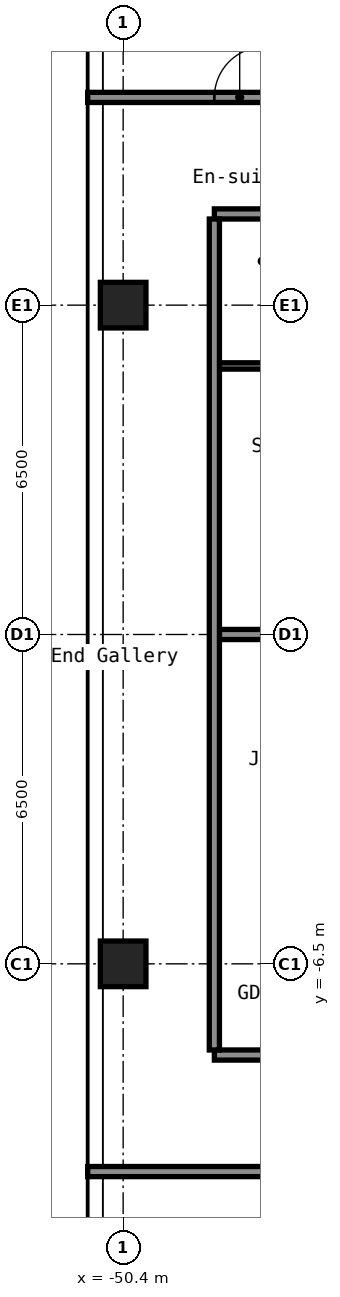
"""IFC4 building model, lengths in metres.
Left out: names, types, materials, properties, quantities, classifications, styles, units other than length and angle.
Written with IfcOpenShell. Run it as: python <this file> out.ifc"""

import sys

from ifc_helpers import new_model, si_unit, direction, frame, frame_2d, origin, origin_2d, place, context, subcontext, project, spatial, rectangle, hollow_rectangle, extrude, element, fill, save


model = new_model("IFC4")
c1 = context("Model", 3, precision=1e-05, world=origin(), true_north=direction((0.0, 1.0)))
c2 = subcontext(c1, "Body", "Model", "MODEL_VIEW")
j1 = project(units=[si_unit("LENGTHUNIT", "METRE"), si_unit("PLANEANGLEUNIT", "RADIAN")], contexts=[c1])
p1 = place(None, origin())
s1 = spatial("IfcSite", under=j1, at=p1, CompositionType="ELEMENT")
p2 = place(p1, origin())
s2 = spatial("IfcBuilding", under=s1, at=p2, CompositionType="ELEMENT")
p3 = place(p2, frame((0.0, 0.0, 26.2)))
s3 = spatial("IfcBuildingStorey", under=s2, at=p3, CompositionType="ELEMENT", Elevation=26.2)
for number, where, z_axis, x_axis in (
    (1, (-50.4, -6.5, 0.0), (0.0, 0.0, 1.0), (1.0, 0.0, 0.0)),
    (2, (-50.4, 6.5, 0.0), (0.0, 0.0, 1.0), (1.0, 0.0, 0.0)),
):
    element("IfcColumn", number, at=place(p3, frame(where, z_axis=z_axis, x_axis=x_axis)), inside=s3, PredefinedType="COLUMN", context=c2, shape_type="SweptSolid", body=[
        extrude(hollow_rectangle(XDim=0.9, YDim=0.9, WallThickness=0.036, at=origin_2d()), origin(), (0.0, 0.0, 1.0), 2.8),
    ])
p4 = place(p3, frame((-51.1, -10.6, 0.0), z_axis=(0.0, 0.0, 1.0), x_axis=(1.0, 0.0, 0.0)))
e3 = element("IfcWall", 3, at=p4, inside=s3, PredefinedType="PARTITIONING", context=c2, shape_type="SweptSolid", body=[
    extrude(rectangle(XDim=34.3, YDim=0.2, at=frame_2d((17.15, 0.0))), origin(), (0.0, 0.0, 1.0), 2.8),
])
p5 = place(p4, frame((4.2, 0.0, 0.0)))
e4 = element("IfcOpeningElement", 4, at=p5, cuts=e3, PredefinedType="OPENING", context=c2, shape_type="SweptSolid", body=[
    extrude(rectangle(XDim=1.0, YDim=2.1, at=frame_2d((0.5, 1.05))), frame((0.0, 0.11, 0.0), z_axis=(0.0, -1.0, 0.0), x_axis=(1.0, 0.0, 0.0)), (0.0, 0.0, 1.0), 0.22),
])
p6 = place(p4, frame((11.34, 0.0, 0.0)))
e5 = element("IfcOpeningElement", 5, at=p6, cuts=e3, PredefinedType="OPENING", context=c2, shape_type="SweptSolid", body=[
    extrude(rectangle(XDim=0.9, YDim=2.1, at=frame_2d((0.45, 1.05))), frame((0.0, 0.11, 0.0), z_axis=(0.0, -1.0, 0.0), x_axis=(1.0, 0.0, 0.0)), (0.0, 0.0, 1.0), 0.22),
])
p7 = place(p4, frame((15.54, 0.0, 0.0)))
e6 = element("IfcOpeningElement", 6, at=p7, cuts=e3, PredefinedType="OPENING", context=c2, shape_type="SweptSolid", body=[
    extrude(rectangle(XDim=0.9, YDim=2.1, at=frame_2d((0.45, 1.05))), frame((0.0, 0.11, 0.0), z_axis=(0.0, -1.0, 0.0), x_axis=(1.0, 0.0, 0.0)), (0.0, 0.0, 1.0), 0.22),
])
p8 = place(p4, frame((21.2, 0.0, 0.0)))
e7 = element("IfcOpeningElement", 7, at=p8, cuts=e3, PredefinedType="OPENING", context=c2, shape_type="SweptSolid", body=[
    extrude(rectangle(XDim=1.0, YDim=2.1, at=frame_2d((0.5, 1.05))), frame((0.0, 0.11, 0.0), z_axis=(0.0, -1.0, 0.0), x_axis=(1.0, 0.0, 0.0)), (0.0, 0.0, 1.0), 0.22),
])
p9 = place(p4, frame((27.97, 0.0, 0.0)))
e8 = element("IfcOpeningElement", 8, at=p9, cuts=e3, PredefinedType="OPENING", context=c2, shape_type="SweptSolid", body=[
    extrude(rectangle(XDim=0.9, YDim=2.1, at=frame_2d((0.45, 1.05))), frame((0.0, 0.11, 0.0), z_axis=(0.0, -1.0, 0.0), x_axis=(1.0, 0.0, 0.0)), (0.0, 0.0, 1.0), 0.22),
])
p10 = place(p4, frame((32.17, 0.0, 0.0)))
e9 = element("IfcOpeningElement", 9, at=p10, cuts=e3, PredefinedType="OPENING", context=c2, shape_type="SweptSolid", body=[
    extrude(rectangle(XDim=0.9, YDim=2.1, at=frame_2d((0.45, 1.05))), frame((0.0, 0.11, 0.0), z_axis=(0.0, -1.0, 0.0), x_axis=(1.0, 0.0, 0.0)), (0.0, 0.0, 1.0), 0.22),
])
p11 = place(p3, frame((-48.6, -8.3, 0.0), z_axis=(0.0, 0.0, 1.0), x_axis=(1.0, 0.0, 0.0)))
e10 = element("IfcWall", 10, at=p11, inside=s3, PredefinedType="PARTITIONING", context=c2, shape_type="SweptSolid", body=[
    extrude(rectangle(XDim=15.0, YDim=0.2, at=frame_2d((7.5, 0.0))), origin(), (0.0, 0.0, 1.0), 2.8),
])
p12 = place(p11, frame((1.1, 0.0, 0.0)))
e11 = element("IfcOpeningElement", 11, at=p12, cuts=e10, PredefinedType="OPENING", context=c2, shape_type="SweptSolid", body=[
    extrude(rectangle(XDim=1.0, YDim=2.1, at=frame_2d((0.5, 1.05))), frame((0.0, 0.11, 0.0), z_axis=(0.0, -1.0, 0.0), x_axis=(1.0, 0.0, 0.0)), (0.0, 0.0, 1.0), 0.22),
])
p13 = place(p11, frame((12.4, 0.0, 0.0)))
e12 = element("IfcOpeningElement", 12, at=p13, cuts=e10, PredefinedType="OPENING", context=c2, shape_type="SweptSolid", body=[
    extrude(rectangle(XDim=1.0, YDim=2.1, at=frame_2d((0.5, 1.05))), frame((0.0, 0.11, 0.0), z_axis=(0.0, -1.0, 0.0), x_axis=(1.0, 0.0, 0.0)), (0.0, 0.0, 1.0), 0.22),
])
p14 = place(p3, frame((-48.5, 0.0, 0.0), z_axis=(0.0, 0.0, 1.0), x_axis=(1.0, 0.0, 0.0)))
e13 = element("IfcWall", 13, at=p14, inside=s3, PredefinedType="PARTITIONING", context=c2, shape_type="SweptSolid", body=[
    extrude(rectangle(XDim=14.9, YDim=0.2, at=frame_2d((7.45, 0.0))), origin(), (0.0, 0.0, 1.0), 2.8),
])
p15 = place(p3, frame((-48.5, 5.3, 0.0), z_axis=(0.0, 0.0, 1.0), x_axis=(1.0, 0.0, 0.0)))
e14 = element("IfcWall", 14, at=p15, inside=s3, PredefinedType="PARTITIONING", context=c2, shape_type="SweptSolid", body=[
    extrude(rectangle(XDim=2.337, YDim=0.125, at=frame_2d((1.169, 0.0))), origin(), (0.0, 0.0, 1.0), 2.8),
])
p16 = place(p3, frame((-48.6, 8.3, 0.0), z_axis=(0.0, 0.0, 1.0), x_axis=(1.0, 0.0, 0.0)))
e15 = element("IfcWall", 15, at=p16, inside=s3, PredefinedType="PARTITIONING", context=c2, shape_type="SweptSolid", body=[
    extrude(rectangle(XDim=15.0, YDim=0.2, at=frame_2d((7.5, 0.0))), origin(), (0.0, 0.0, 1.0), 2.8),
])
p17 = place(p16, frame((4.05, 0.0, 0.0)))
e16 = element("IfcOpeningElement", 16, at=p17, cuts=e15, PredefinedType="OPENING", context=c2, shape_type="SweptSolid", body=[
    extrude(rectangle(XDim=1.0, YDim=2.1, at=frame_2d((0.5, 1.05))), frame((0.0, 0.11, 0.0), z_axis=(0.0, -1.0, 0.0), x_axis=(1.0, 0.0, 0.0)), (0.0, 0.0, 1.0), 0.22),
])
p18 = place(p16, frame((9.45, 0.0, 0.0)))
e17 = element("IfcOpeningElement", 17, at=p18, cuts=e15, PredefinedType="OPENING", context=c2, shape_type="SweptSolid", body=[
    extrude(rectangle(XDim=1.0, YDim=2.1, at=frame_2d((0.5, 1.05))), frame((0.0, 0.11, 0.0), z_axis=(0.0, -1.0, 0.0), x_axis=(1.0, 0.0, 0.0)), (0.0, 0.0, 1.0), 0.22),
])
p19 = place(p16, frame((11.15, 0.0, 0.0)))
e18 = element("IfcOpeningElement", 18, at=p19, cuts=e15, PredefinedType="OPENING", context=c2, shape_type="SweptSolid", body=[
    extrude(rectangle(XDim=1.0, YDim=2.1, at=frame_2d((0.5, 1.05))), frame((0.0, 0.11, 0.0), z_axis=(0.0, -1.0, 0.0), x_axis=(1.0, 0.0, 0.0)), (0.0, 0.0, 1.0), 0.22),
])
p20 = place(p3, frame((-51.1, 10.6, 0.0), z_axis=(0.0, 0.0, 1.0), x_axis=(1.0, 0.0, 0.0)))
e19 = element("IfcWall", 19, at=p20, inside=s3, PredefinedType="PARTITIONING", context=c2, shape_type="SweptSolid", body=[
    extrude(rectangle(XDim=34.3, YDim=0.2, at=frame_2d((17.15, 0.0))), origin(), (0.0, 0.0, 1.0), 2.8),
])
p21 = place(p20, frame((2.5, 0.0, 0.0)))
e20 = element("IfcOpeningElement", 20, at=p21, cuts=e19, PredefinedType="OPENING", context=c2, shape_type="SweptSolid", body=[
    extrude(rectangle(XDim=1.0, YDim=2.1, at=frame_2d((0.5, 1.05))), frame((0.0, 0.11, 0.0), z_axis=(0.0, -1.0, 0.0), x_axis=(1.0, 0.0, 0.0)), (0.0, 0.0, 1.0), 0.22),
])
p22 = place(p20, frame((11.95, 0.0, 0.0)))
e21 = element("IfcOpeningElement", 21, at=p22, cuts=e19, PredefinedType="OPENING", context=c2, shape_type="SweptSolid", body=[
    extrude(rectangle(XDim=1.0, YDim=2.1, at=frame_2d((0.5, 1.05))), frame((0.0, 0.11, 0.0), z_axis=(0.0, -1.0, 0.0), x_axis=(1.0, 0.0, 0.0)), (0.0, 0.0, 1.0), 0.22),
])
p23 = place(p20, frame((13.65, 0.0, 0.0)))
e22 = element("IfcOpeningElement", 22, at=p23, cuts=e19, PredefinedType="OPENING", context=c2, shape_type="SweptSolid", body=[
    extrude(rectangle(XDim=1.0, YDim=2.1, at=frame_2d((0.5, 1.05))), frame((0.0, 0.11, 0.0), z_axis=(0.0, -1.0, 0.0), x_axis=(1.0, 0.0, 0.0)), (0.0, 0.0, 1.0), 0.22),
])
p24 = place(p20, frame((23.0, 0.0, 0.0)))
e23 = element("IfcOpeningElement", 23, at=p24, cuts=e19, PredefinedType="OPENING", context=c2, shape_type="SweptSolid", body=[
    extrude(rectangle(XDim=1.0, YDim=2.1, at=frame_2d((0.5, 1.05))), frame((0.0, 0.11, 0.0), z_axis=(0.0, -1.0, 0.0), x_axis=(1.0, 0.0, 0.0)), (0.0, 0.0, 1.0), 0.22),
])
p25 = place(p20, frame((28.75, 0.0, 0.0)))
e24 = element("IfcOpeningElement", 24, at=p25, cuts=e19, PredefinedType="OPENING", context=c2, shape_type="SweptSolid", body=[
    extrude(rectangle(XDim=1.0, YDim=2.1, at=frame_2d((0.5, 1.05))), frame((0.0, 0.11, 0.0), z_axis=(0.0, -1.0, 0.0), x_axis=(1.0, 0.0, 0.0)), (0.0, 0.0, 1.0), 0.22),
])
p26 = place(p20, frame((30.45, 0.0, 0.0)))
e25 = element("IfcOpeningElement", 25, at=p26, cuts=e19, PredefinedType="OPENING", context=c2, shape_type="SweptSolid", body=[
    extrude(rectangle(XDim=1.0, YDim=2.1, at=frame_2d((0.5, 1.05))), frame((0.0, 0.11, 0.0), z_axis=(0.0, -1.0, 0.0), x_axis=(1.0, 0.0, 0.0)), (0.0, 0.0, 1.0), 0.22),
])
p27 = place(p3, frame((-48.6, -8.2, 0.0), z_axis=(0.0, 0.0, 1.0), x_axis=(0.0, 1.0, 0.0)))
e26 = element("IfcWall", 26, at=p27, inside=s3, PredefinedType="PARTITIONING", context=c2, shape_type="SweptSolid", body=[
    extrude(rectangle(XDim=16.4, YDim=0.2, at=frame_2d((8.2, 0.0))), origin(), (0.0, 0.0, 1.0), 2.8),
])
p28 = place(p21, origin())
e27 = element("IfcDoor", 27, at=p28, inside=s3, OperationType="SINGLE_SWING_LEFT", PredefinedType="DOOR", context=c2, shape_type="SweptSolid", body=[
    extrude(rectangle(XDim=1.0, YDim=2.1, at=frame_2d((0.5, 1.05))), frame((0.0, 0.025, 0.0), z_axis=(0.0, -1.0, 0.0), x_axis=(1.0, 0.0, 0.0)), (0.0, 0.0, 1.0), 0.05),
])
fill(e20, e27)
save(model, sys.argv[1])
